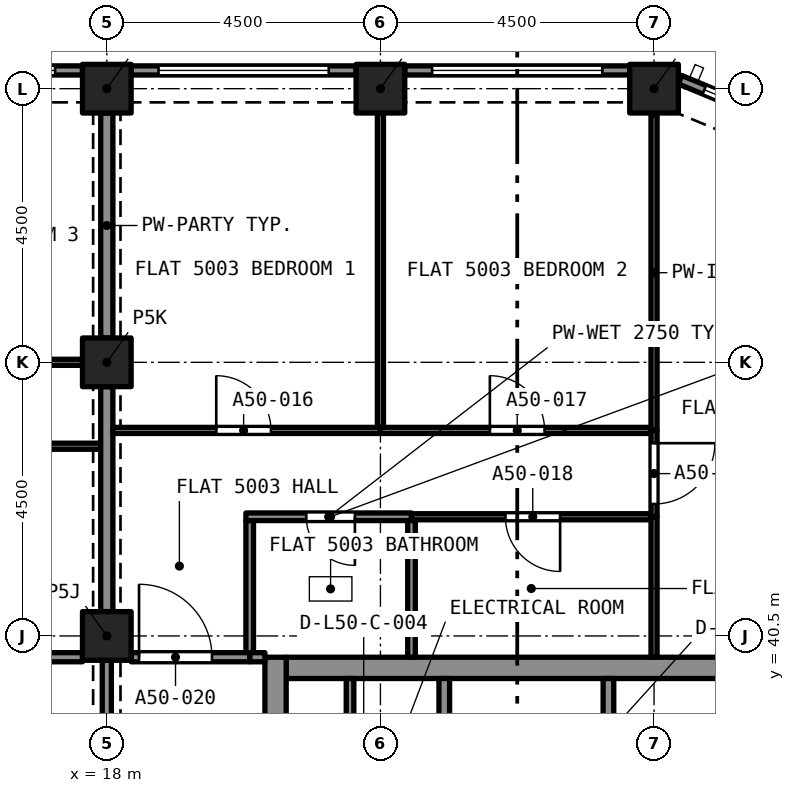
"""IFC4 building model, lengths in metres.
Left out: names, types, materials, properties, quantities, classifications, styles, units other than length and angle.
Written with IfcOpenShell. Run it as: python <this file> out.ifc"""

import sys

from ifc_helpers import new_model, si_unit, direction, frame, frame_2d, origin, origin_2d, place, context, subcontext, project, spatial, rectangle, extrude, element, fill, save


model = new_model("IFC4")
c1 = context("Model", 3, precision=1e-05, world=origin(), true_north=direction((0.0, 1.0)))
c2 = subcontext(c1, "Body", "Model", "MODEL_VIEW")
j1 = project(units=[si_unit("LENGTHUNIT", "METRE"), si_unit("PLANEANGLEUNIT", "RADIAN")], contexts=[c1])
p1 = place(None, origin())
s1 = spatial("IfcSite", under=j1, at=p1, CompositionType="ELEMENT")
p2 = place(p1, origin())
s2 = spatial("IfcBuilding", under=s1, at=p2, CompositionType="ELEMENT")
p3 = place(p2, frame((0.0, 0.0, 182.7)))
s3 = spatial("IfcBuildingStorey", under=s2, at=p3, CompositionType="ELEMENT", Elevation=182.7)
for number, where, z_axis, x_axis in (
    (1, (18.0, 40.5, 0.0), (0.0, 0.0, 1.0), (1.0, 0.0, 0.0)),
    (2, (18.0, 45.0, 0.0), (0.0, 0.0, 1.0), (1.0, 0.0, 0.0)),
    (3, (18.0, 49.5, 0.0), (0.0, 0.0, 1.0), (1.0, 0.0, 0.0)),
    (4, (22.5, 49.5, 0.0), (0.0, 0.0, 1.0), (1.0, 0.0, 0.0)),
    (5, (27.0, 49.5, 0.0), (0.0, 0.0, 1.0), (1.0, 0.0, 0.0)),
):
    element("IfcColumn", number, at=place(p3, frame(where, z_axis=z_axis, x_axis=x_axis)), inside=s3, PredefinedType="COLUMN", context=c2, shape_type="SweptSolid", body=[
        extrude(rectangle(XDim=0.8, YDim=0.8, at=origin_2d()), origin(), (0.0, 0.0, 1.0), 3.2),
    ])
p4 = place(p3, frame((20.95, 39.975, 0.0), z_axis=(0.0, 0.0, 1.0), x_axis=(1.0, 0.0, 0.0)))
e6 = element("IfcWall", 6, at=p4, inside=s3, PredefinedType="SOLIDWALL", context=c2, shape_type="SweptSolid", body=[
    extrude(rectangle(XDim=7.6, YDim=0.35, at=frame_2d((3.8, 0.0))), origin(), (0.0, 0.0, 1.0), 3.2),
])
p5 = place(p3, frame((20.775, 27.35, 0.0), z_axis=(0.0, 0.0, 1.0), x_axis=(0.0, 1.0, 0.0)))
e7 = element("IfcWall", 7, at=p5, inside=s3, PredefinedType="SOLIDWALL", context=c2, shape_type="SweptSolid", body=[
    extrude(rectangle(XDim=12.8, YDim=0.35, at=frame_2d((6.4, 0.0))), origin(), (0.0, 0.0, 1.0), 3.2),
])
p6 = place(p5, frame((8.6, 0.0, 0.0)))
e8 = element("IfcOpeningElement", 8, at=p6, cuts=e7, PredefinedType="OPENING", context=c2, shape_type="SweptSolid", body=[
    extrude(rectangle(XDim=1.2, YDim=2.1, at=frame_2d((0.6, 1.05))), frame((0.0, 0.185, 0.0), z_axis=(0.0, -1.0, 0.0), x_axis=(1.0, 0.0, 0.0)), (0.0, 0.0, 1.0), 0.37),
])
p7 = place(p3, frame((27.429, 49.647, 0.0), z_axis=(0.0, 0.0, 1.0), x_axis=(0.923885342263, -0.382669406082, 0.0)))
e9 = element("IfcWall", 9, at=p7, inside=s3, PredefinedType="SOLIDWALL", context=c2, shape_type="SweptSolid", body=[
    extrude(rectangle(XDim=2.602, YDim=0.15, at=frame_2d((1.301, 0.0))), origin(), (0.0, 0.0, 1.0), 3.2),
])
p8 = place(p7, frame((0.432, 0.0, 0.45)))
e10 = element("IfcOpeningElement", 10, at=p8, cuts=e9, PredefinedType="OPENING", context=c2, shape_type="SweptSolid", body=[
    extrude(rectangle(XDim=1.9, YDim=1.95, at=frame_2d((0.95, 0.975))), frame((0.0, 0.085, 0.0), z_axis=(0.0, -1.0, 0.0), x_axis=(1.0, 0.0, 0.0)), (0.0, 0.0, 1.0), 0.17),
])
p9 = place(p3, frame((22.9, 49.8, 0.0), z_axis=(0.0, 0.0, 1.0), x_axis=(1.0, 0.0, 0.0)))
e11 = element("IfcWall", 11, at=p9, inside=s3, PredefinedType="SOLIDWALL", context=c2, shape_type="SweptSolid", body=[
    extrude(rectangle(XDim=3.7, YDim=0.15, at=frame_2d((1.85, 0.0))), origin(), (0.0, 0.0, 1.0), 3.2),
])
p10 = place(p9, frame((0.45, 0.0, 0.45)))
e12 = element("IfcOpeningElement", 12, at=p10, cuts=e11, PredefinedType="OPENING", context=c2, shape_type="SweptSolid", body=[
    extrude(rectangle(XDim=2.8, YDim=1.95, at=frame_2d((1.4, 0.975))), frame((0.0, 0.085, 0.0), z_axis=(0.0, -1.0, 0.0), x_axis=(1.0, 0.0, 0.0)), (0.0, 0.0, 1.0), 0.17),
])
p11 = place(p3, frame((18.4, 49.8, 0.0), z_axis=(0.0, 0.0, 1.0), x_axis=(1.0, 0.0, 0.0)))
e13 = element("IfcWall", 13, at=p11, inside=s3, PredefinedType="SOLIDWALL", context=c2, shape_type="SweptSolid", body=[
    extrude(rectangle(XDim=3.7, YDim=0.15, at=frame_2d((1.85, 0.0))), origin(), (0.0, 0.0, 1.0), 3.2),
])
p12 = place(p11, frame((0.45, 0.0, 0.45)))
e14 = element("IfcOpeningElement", 14, at=p12, cuts=e13, PredefinedType="OPENING", context=c2, shape_type="SweptSolid", body=[
    extrude(rectangle(XDim=2.8, YDim=1.95, at=frame_2d((1.4, 0.975))), frame((0.0, 0.085, 0.0), z_axis=(0.0, -1.0, 0.0), x_axis=(1.0, 0.0, 0.0)), (0.0, 0.0, 1.0), 0.17),
])
p13 = place(p3, frame((13.9, 49.8, 0.0), z_axis=(0.0, 0.0, 1.0), x_axis=(1.0, 0.0, 0.0)))
e15 = element("IfcWall", 15, at=p13, inside=s3, PredefinedType="SOLIDWALL", context=c2, shape_type="SweptSolid", body=[
    extrude(rectangle(XDim=3.7, YDim=0.15, at=frame_2d((1.85, 0.0))), origin(), (0.0, 0.0, 1.0), 3.2),
])
p14 = place(p13, frame((0.45, 0.0, 0.45)))
e16 = element("IfcOpeningElement", 16, at=p14, cuts=e15, PredefinedType="OPENING", context=c2, shape_type="SweptSolid", body=[
    extrude(rectangle(XDim=2.8, YDim=1.95, at=frame_2d((1.4, 0.975))), frame((0.0, 0.085, 0.0), z_axis=(0.0, -1.0, 0.0), x_axis=(1.0, 0.0, 0.0)), (0.0, 0.0, 1.0), 0.17),
])
p15 = place(p3, frame((13.5, 45.0, 0.0), z_axis=(0.0, 0.0, 1.0), x_axis=(1.0, 0.0, 0.0)))
e17 = element("IfcWall", 17, at=p15, inside=s3, PredefinedType="PARTITIONING", context=c2, shape_type="SweptSolid", body=[
    extrude(rectangle(XDim=4.1, YDim=0.1, at=frame_2d((2.05, 0.0))), origin(), (0.0, 0.0, 1.0), 2.9),
])
p16 = place(p15, frame((1.8, 0.0, 0.0)))
e18 = element("IfcOpeningElement", 18, at=p16, cuts=e17, PredefinedType="OPENING", context=c2, shape_type="SweptSolid", body=[
    extrude(rectangle(XDim=0.9, YDim=2.1, at=frame_2d((0.45, 1.05))), frame((0.0, 0.06, 0.0), z_axis=(0.0, -1.0, 0.0), x_axis=(1.0, 0.0, 0.0)), (0.0, 0.0, 1.0), 0.12),
])
p17 = place(p3, frame((18.0, 45.4, 0.0), z_axis=(0.0, 0.0, 1.0), x_axis=(0.0, 1.0, 0.0)))
e19 = element("IfcWall", 19, at=p17, inside=s3, PredefinedType="PARTITIONING", context=c2, shape_type="SweptSolid", body=[
    extrude(rectangle(XDim=3.7, YDim=0.2, at=frame_2d((1.85, 0.0))), origin(), (0.0, 0.0, 1.0), 2.38),
])
p18 = place(p3, frame((17.9, 43.62, 0.0), z_axis=(0.0, 0.0, 1.0), x_axis=(-1.0, 0.0, 0.0)))
e20 = element("IfcWall", 20, at=p18, inside=s3, PredefinedType="PARTITIONING", context=c2, shape_type="SweptSolid", body=[
    extrude(rectangle(XDim=6.034, YDim=0.1, at=frame_2d((3.017, 0.0))), origin(), (0.0, 0.0, 1.0), 2.9),
])
p19 = place(p18, frame((2.517, 0.0, 0.0)))
e21 = element("IfcOpeningElement", 21, at=p19, cuts=e20, PredefinedType="OPENING", context=c2, shape_type="SweptSolid", body=[
    extrude(rectangle(XDim=0.9, YDim=2.1, at=frame_2d((0.45, 1.05))), frame((0.0, 0.06, 0.0), z_axis=(0.0, -1.0, 0.0), x_axis=(1.0, 0.0, 0.0)), (0.0, 0.0, 1.0), 0.12),
])
p20 = place(p3, frame((18.0, 40.9, 0.0), z_axis=(0.0, 0.0, 1.0), x_axis=(0.0, 1.0, 0.0)))
e22 = element("IfcWall", 22, at=p20, inside=s3, PredefinedType="PARTITIONING", context=c2, shape_type="SweptSolid", body=[
    extrude(rectangle(XDim=3.7, YDim=0.2, at=frame_2d((1.85, 0.0))), origin(), (0.0, 0.0, 1.0), 2.38),
])
p21 = place(p3, frame((13.15, 40.15, 0.0), z_axis=(0.0, 0.0, 1.0), x_axis=(1.0, 0.0, 0.0)))
e23 = element("IfcWall", 23, at=p21, inside=s3, PredefinedType="PARTITIONING", context=c2, shape_type="SweptSolid", body=[
    extrude(rectangle(XDim=4.45, YDim=0.15, at=frame_2d((2.225, 0.0))), origin(), (0.0, 0.0, 1.0), 2.9),
])
p22 = place(p3, frame((20.35, 40.225, 0.0), z_axis=(0.0, 0.0, 1.0), x_axis=(0.0, 1.0, 0.0)))
e24 = element("IfcWall", 24, at=p22, inside=s3, PredefinedType="PARTITIONING", context=c2, shape_type="SweptSolid", body=[
    extrude(rectangle(XDim=2.172, YDim=0.125, at=frame_2d((1.086, 0.0))), origin(), (0.0, 0.0, 1.0), 2.75),
])
p23 = place(p3, frame((23.011, 42.46, 0.0), z_axis=(0.0, 0.0, 1.0), x_axis=(-1.0, 0.0, 0.0)))
e25 = element("IfcWall", 25, at=p23, inside=s3, PredefinedType="PARTITIONING", context=c2, shape_type="SweptSolid", body=[
    extrude(rectangle(XDim=2.723, YDim=0.125, at=frame_2d((1.362, 0.0))), origin(), (0.0, 0.0, 1.0), 2.75),
])
p24 = place(p23, frame((0.93, 0.0, 0.0)))
e26 = element("IfcOpeningElement", 26, at=p24, cuts=e25, PredefinedType="OPENING", context=c2, shape_type="SweptSolid", body=[
    extrude(rectangle(XDim=0.8, YDim=2.1, at=frame_2d((0.4, 1.05))), frame((0.0, 0.073, 0.0), z_axis=(0.0, -1.0, 0.0), x_axis=(1.0, 0.0, 0.0)), (0.0, 0.0, 1.0), 0.145),
])
p25 = place(p3, frame((23.011, 40.15, 0.0), z_axis=(0.0, 0.0, 1.0), x_axis=(0.0, 1.0, 0.0)))
e27 = element("IfcWall", 27, at=p25, inside=s3, PredefinedType="PARTITIONING", context=c2, shape_type="SweptSolid", body=[
    extrude(rectangle(XDim=2.248, YDim=0.125, at=frame_2d((1.124, 0.0))), origin(), (0.0, 0.0, 1.0), 2.75),
])
p26 = place(p3, frame((20.35, 40.15, 0.0), z_axis=(0.0, 0.0, 1.0), x_axis=(1.0, 0.0, 0.0)))
e28 = element("IfcWall", 28, at=p26, inside=s3, PredefinedType="PARTITIONING", context=c2, shape_type="SweptSolid", body=[
    extrude(rectangle(XDim=0.25, YDim=0.15, at=frame_2d((0.125, 0.0))), origin(), (0.0, 0.0, 1.0), 2.75),
])
p27 = place(p3, frame((22.5, 43.93, 0.0), z_axis=(0.0, 0.0, 1.0), x_axis=(0.0, 1.0, 0.0)))
e29 = element("IfcWall", 29, at=p27, inside=s3, PredefinedType="PARTITIONING", context=c2, shape_type="SweptSolid", body=[
    extrude(rectangle(XDim=5.17, YDim=0.1, at=frame_2d((2.585, 0.0))), origin(), (0.0, 0.0, 1.0), 2.75),
])
p28 = place(p3, frame((18.1, 43.88, 0.0), z_axis=(0.0, 0.0, 1.0), x_axis=(1.0, 0.0, 0.0)))
e30 = element("IfcWall", 30, at=p28, inside=s3, PredefinedType="PARTITIONING", context=c2, shape_type="SweptSolid", body=[
    extrude(rectangle(XDim=4.4, YDim=0.1, at=frame_2d((2.2, 0.0))), origin(), (0.0, 0.0, 1.0), 2.75),
])
p29 = place(p28, frame((1.7, 0.0, 0.0)))
e31 = element("IfcOpeningElement", 31, at=p29, cuts=e30, PredefinedType="OPENING", context=c2, shape_type="SweptSolid", body=[
    extrude(rectangle(XDim=0.9, YDim=2.1, at=frame_2d((0.45, 1.05))), frame((0.0, 0.06, 0.0), z_axis=(0.0, -1.0, 0.0), x_axis=(1.0, 0.0, 0.0)), (0.0, 0.0, 1.0), 0.12),
])
p30 = place(p3, frame((22.5, 43.88, 0.0), z_axis=(0.0, 0.0, 1.0), x_axis=(1.0, 0.0, 0.0)))
e32 = element("IfcWall", 32, at=p30, inside=s3, PredefinedType="PARTITIONING", context=c2, shape_type="SweptSolid", body=[
    extrude(rectangle(XDim=4.45, YDim=0.1, at=frame_2d((2.225, 0.0))), origin(), (0.0, 0.0, 1.0), 2.75),
])
p31 = place(p30, frame((1.8, 0.0, 0.0)))
e33 = element("IfcOpeningElement", 33, at=p31, cuts=e32, PredefinedType="OPENING", context=c2, shape_type="SweptSolid", body=[
    extrude(rectangle(XDim=0.9, YDim=2.1, at=frame_2d((0.45, 1.05))), frame((0.0, 0.06, 0.0), z_axis=(0.0, -1.0, 0.0), x_axis=(1.0, 0.0, 0.0)), (0.0, 0.0, 1.0), 0.12),
])
p32 = place(p3, frame((27.0, 43.88, 0.0), z_axis=(0.0, 0.0, 1.0), x_axis=(0.0, 1.0, 0.0)))
e34 = element("IfcWall", 34, at=p32, inside=s3, PredefinedType="PARTITIONING", context=c2, shape_type="SweptSolid", body=[
    extrude(rectangle(XDim=5.187, YDim=0.1, at=frame_2d((2.594, 0.0))), origin(), (0.0, 0.0, 1.0), 2.75),
])
p33 = place(p3, frame((26.95, 42.46, 0.0), z_axis=(0.0, 0.0, 1.0), x_axis=(-1.0, 0.0, 0.0)))
e35 = element("IfcWall", 35, at=p33, inside=s3, PredefinedType="PARTITIONING", context=c2, shape_type="SweptSolid", body=[
    extrude(rectangle(XDim=3.939, YDim=0.1, at=frame_2d((1.97, 0.0))), origin(), (0.0, 0.0, 1.0), 2.75),
])
p34 = place(p33, frame((1.495, 0.0, 0.0)))
e36 = element("IfcOpeningElement", 36, at=p34, cuts=e35, PredefinedType="OPENING", context=c2, shape_type="SweptSolid", body=[
    extrude(rectangle(XDim=0.9, YDim=2.1, at=frame_2d((0.45, 1.05))), frame((0.0, 0.06, 0.0), z_axis=(0.0, -1.0, 0.0), x_axis=(1.0, 0.0, 0.0)), (0.0, 0.0, 1.0), 0.12),
])
p35 = place(p3, frame((27.0, 43.88, 0.0), z_axis=(0.0, 0.0, 1.0), x_axis=(0.0, -1.0, 0.0)))
e37 = element("IfcWall", 37, at=p35, inside=s3, PredefinedType="PARTITIONING", context=c2, shape_type="SweptSolid", body=[
    extrude(rectangle(XDim=1.42, YDim=0.1, at=frame_2d((0.71, 0.0))), origin(), (0.0, 0.0, 1.0), 2.75),
])
p36 = place(p35, frame((0.21, 0.0, 0.0)))
e38 = element("IfcOpeningElement", 38, at=p36, cuts=e37, PredefinedType="OPENING", context=c2, shape_type="SweptSolid", body=[
    extrude(rectangle(XDim=1.0, YDim=2.1, at=frame_2d((0.5, 1.05))), frame((0.0, 0.06, 0.0), z_axis=(0.0, -1.0, 0.0), x_axis=(1.0, 0.0, 0.0)), (0.0, 0.0, 1.0), 0.12),
])
p37 = place(p3, frame((18.4, 40.15, 0.0), z_axis=(0.0, 0.0, 1.0), x_axis=(1.0, 0.0, 0.0)))
e39 = element("IfcWall", 39, at=p37, inside=s3, PredefinedType="PARTITIONING", context=c2, shape_type="SweptSolid", body=[
    extrude(rectangle(XDim=1.95, YDim=0.15, at=frame_2d((0.975, 0.0))), origin(), (0.0, 0.0, 1.0), 2.75),
])
p38 = place(p37, frame((0.13, 0.0, 0.0)))
e40 = element("IfcOpeningElement", 40, at=p38, cuts=e39, PredefinedType="OPENING", context=c2, shape_type="SweptSolid", body=[
    extrude(rectangle(XDim=1.2, YDim=2.4, at=frame_2d((0.6, 1.2))), frame((0.0, 0.085, 0.0), z_axis=(0.0, -1.0, 0.0), x_axis=(1.0, 0.0, 0.0)), (0.0, 0.0, 1.0), 0.17),
])
p39 = place(p3, frame((27.0, 40.15, 0.0), z_axis=(0.0, 0.0, 1.0), x_axis=(0.0, 1.0, 0.0)))
e41 = element("IfcWall", 41, at=p39, inside=s3, PredefinedType="PARTITIONING", context=c2, shape_type="SweptSolid", body=[
    extrude(rectangle(XDim=2.31, YDim=0.1, at=frame_2d((1.155, 0.0))), origin(), (0.0, 0.0, 1.0), 2.75),
])
p40 = place(p3, frame((18.0, 40.1, 0.0), z_axis=(0.0, 0.0, 1.0), x_axis=(0.0, -1.0, 0.0)))
e42 = element("IfcWall", 42, at=p40, inside=s3, PredefinedType="PARTITIONING", context=c2, shape_type="SweptSolid", body=[
    extrude(rectangle(XDim=3.7, YDim=0.15, at=frame_2d((1.85, 0.0))), origin(), (0.0, 0.0, 1.0), 2.38),
])
p41 = place(p40, frame((1.25, 0.0, 0.0)))
e43 = element("IfcOpeningElement", 43, at=p41, cuts=e42, PredefinedType="OPENING", context=c2, shape_type="SweptSolid", body=[
    extrude(rectangle(XDim=1.2, YDim=2.1, at=frame_2d((0.6, 1.05))), frame((0.0, 0.085, 0.0), z_axis=(0.0, -1.0, 0.0), x_axis=(1.0, 0.0, 0.0)), (0.0, 0.0, 1.0), 0.17),
])
for number, where, z_axis, x_axis in (
    (44, (23.55, 37.5, 0.0), (0.0, 0.0, 1.0), (0.0, 1.0, 0.0)),
    (45, (26.25, 37.5, 0.0), (0.0, 0.0, 1.0), (0.0, 1.0, 0.0)),
):
    element("IfcWall", number, at=place(p3, frame(where, z_axis=z_axis, x_axis=x_axis)), inside=s3, PredefinedType="SOLIDWALL", context=c2, shape_type="SweptSolid", body=[
        extrude(rectangle(XDim=2.3, YDim=0.175, at=frame_2d((1.15, 0.0))), origin(), (0.0, 0.0, 1.0), 2.9),
    ])
p42 = place(p3, frame((22.0, 37.5, 0.0), z_axis=(0.0, 0.0, 1.0), x_axis=(0.0, 1.0, 0.0)))
e46 = element("IfcWall", 46, at=p42, inside=s3, PredefinedType="PARTITIONING", context=c2, shape_type="SweptSolid", body=[
    extrude(rectangle(XDim=2.3, YDim=0.125, at=frame_2d((1.15, 0.0))), origin(), (0.0, 0.0, 1.0), 2.9),
])
p43 = place(p8, origin())
e47 = element("IfcWindow", 47, at=p43, inside=s3, PartitioningType="SINGLE_PANEL", PredefinedType="WINDOW", context=c2, shape_type="SweptSolid", body=[
    extrude(rectangle(XDim=1.9, YDim=1.95, at=frame_2d((0.95, 0.975))), frame((0.0, 0.03, 0.0), z_axis=(0.0, -1.0, 0.0), x_axis=(1.0, 0.0, 0.0)), (0.0, 0.0, 1.0), 0.06),
])
fill(e10, e47)
p44 = place(p10, origin())
e48 = element("IfcWindow", 48, at=p44, inside=s3, PartitioningType="SINGLE_PANEL", PredefinedType="WINDOW", context=c2, shape_type="SweptSolid", body=[
    extrude(rectangle(XDim=2.8, YDim=1.95, at=frame_2d((1.4, 0.975))), frame((0.0, 0.03, 0.0), z_axis=(0.0, -1.0, 0.0), x_axis=(1.0, 0.0, 0.0)), (0.0, 0.0, 1.0), 0.06),
])
fill(e12, e48)
p45 = place(p12, origin())
e49 = element("IfcWindow", 49, at=p45, inside=s3, PartitioningType="SINGLE_PANEL", PredefinedType="WINDOW", context=c2, shape_type="SweptSolid", body=[
    extrude(rectangle(XDim=2.8, YDim=1.95, at=frame_2d((1.4, 0.975))), frame((0.0, 0.03, 0.0), z_axis=(0.0, -1.0, 0.0), x_axis=(1.0, 0.0, 0.0)), (0.0, 0.0, 1.0), 0.06),
])
fill(e14, e49)
p46 = place(p14, origin())
e50 = element("IfcWindow", 50, at=p46, inside=s3, PartitioningType="SINGLE_PANEL", PredefinedType="WINDOW", context=c2, shape_type="SweptSolid", body=[
    extrude(rectangle(XDim=2.8, YDim=1.95, at=frame_2d((1.4, 0.975))), frame((0.0, 0.03, 0.0), z_axis=(0.0, -1.0, 0.0), x_axis=(1.0, 0.0, 0.0)), (0.0, 0.0, 1.0), 0.06),
])
fill(e16, e50)
p47 = place(p24, origin())
e51 = element("IfcDoor", 51, at=p47, inside=s3, OperationType="SINGLE_SWING_LEFT", PredefinedType="DOOR", context=c2, shape_type="SweptSolid", body=[
    extrude(rectangle(XDim=0.8, YDim=2.1, at=frame_2d((0.4, 1.05))), frame((0.0, 0.025, 0.0), z_axis=(0.0, -1.0, 0.0), x_axis=(1.0, 0.0, 0.0)), (0.0, 0.0, 1.0), 0.05),
])
fill(e26, e51)
p48 = place(p29, origin())
e52 = element("IfcDoor", 52, at=p48, inside=s3, OperationType="SINGLE_SWING_LEFT", PredefinedType="DOOR", context=c2, shape_type="SweptSolid", body=[
    extrude(rectangle(XDim=0.9, YDim=2.1, at=frame_2d((0.45, 1.05))), frame((0.0, 0.025, 0.0), z_axis=(0.0, -1.0, 0.0), x_axis=(1.0, 0.0, 0.0)), (0.0, 0.0, 1.0), 0.05),
])
fill(e31, e52)
p49 = place(p31, origin())
e53 = element("IfcDoor", 53, at=p49, inside=s3, OperationType="SINGLE_SWING_RIGHT", PredefinedType="DOOR", context=c2, shape_type="SweptSolid", body=[
    extrude(rectangle(XDim=0.9, YDim=2.1, at=frame_2d((0.45, 1.05))), frame((0.0, 0.025, 0.0), z_axis=(0.0, -1.0, 0.0), x_axis=(1.0, 0.0, 0.0)), (0.0, 0.0, 1.0), 0.05),
])
fill(e33, e53)
p50 = place(p34, origin())
e54 = element("IfcDoor", 54, at=p50, inside=s3, OperationType="SINGLE_SWING_LEFT", PredefinedType="DOOR", context=c2, shape_type="SweptSolid", body=[
    extrude(rectangle(XDim=0.9, YDim=2.1, at=frame_2d((0.45, 1.05))), frame((0.0, 0.025, 0.0), z_axis=(0.0, -1.0, 0.0), x_axis=(1.0, 0.0, 0.0)), (0.0, 0.0, 1.0), 0.05),
])
fill(e36, e54)
p51 = place(p36, origin())
e55 = element("IfcDoor", 55, at=p51, inside=s3, OperationType="SINGLE_SWING_RIGHT", PredefinedType="DOOR", context=c2, shape_type="SweptSolid", body=[
    extrude(rectangle(XDim=1.0, YDim=2.1, at=frame_2d((0.5, 1.05))), frame((0.0, 0.025, 0.0), z_axis=(0.0, -1.0, 0.0), x_axis=(1.0, 0.0, 0.0)), (0.0, 0.0, 1.0), 0.05),
])
fill(e38, e55)
p52 = place(p38, origin())
e56 = element("IfcDoor", 56, at=p52, inside=s3, OperationType="SINGLE_SWING_LEFT", PredefinedType="DOOR", context=c2, shape_type="SweptSolid", body=[
    extrude(rectangle(XDim=1.2, YDim=2.4, at=frame_2d((0.6, 1.2))), frame((0.0, 0.025, 0.0), z_axis=(0.0, -1.0, 0.0), x_axis=(1.0, 0.0, 0.0)), (0.0, 0.0, 1.0), 0.05),
])
fill(e40, e56)
save(model, sys.argv[1])
